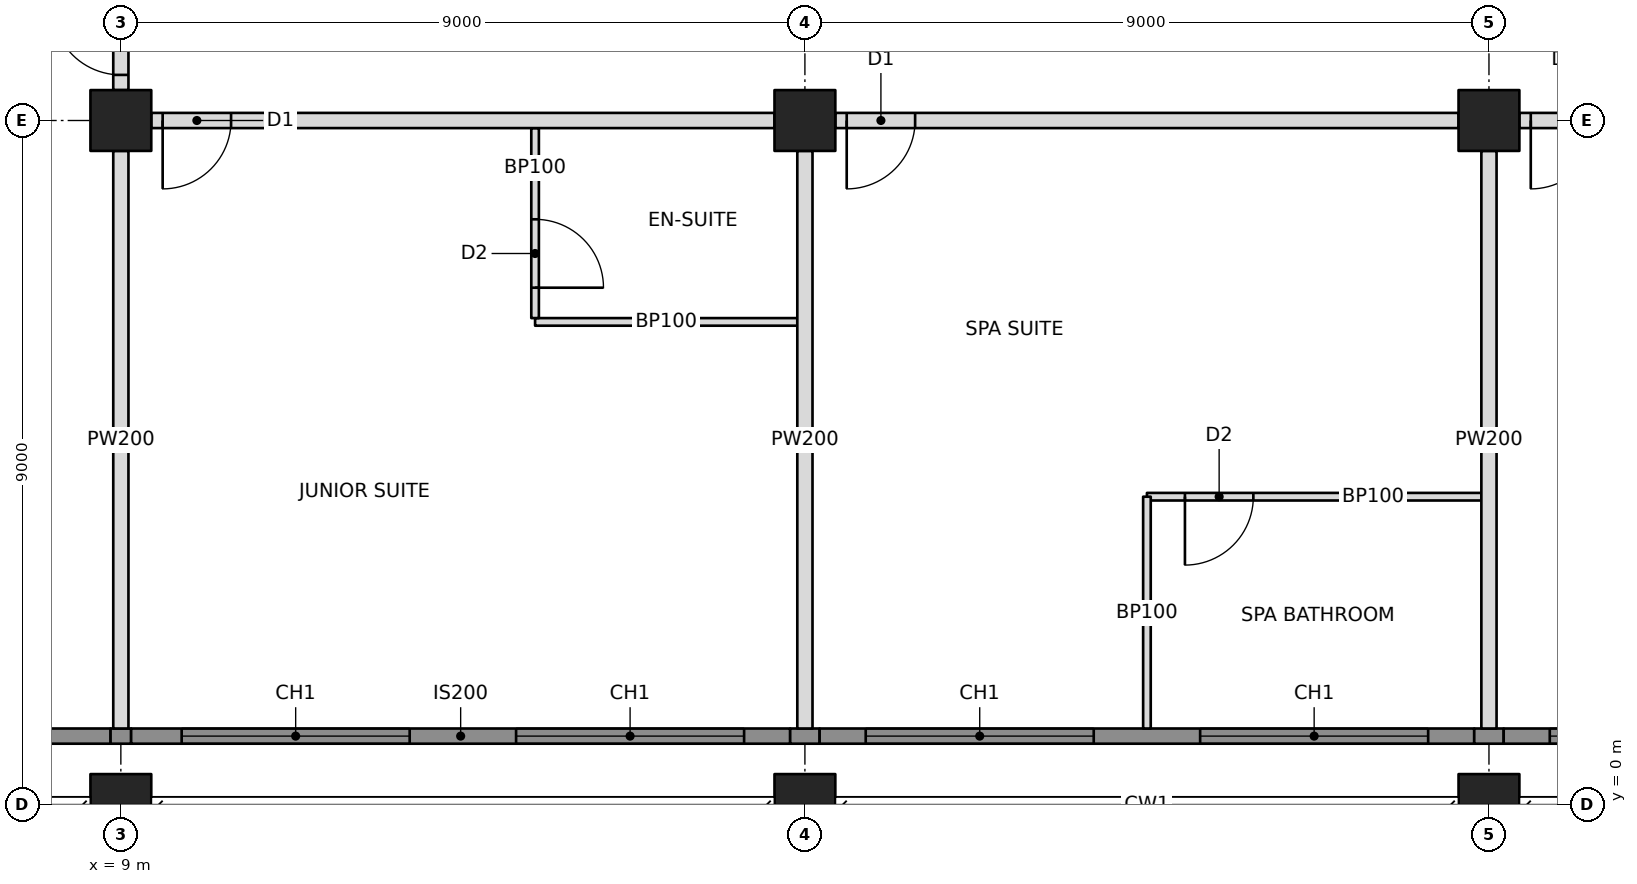
"""IFC4 building model, lengths in metres.
Left out: names, types, materials, properties, quantities, classifications, styles, units other than length and angle.
Written with IfcOpenShell. Run it as: python <this file> out.ifc"""

import sys

from ifc_helpers import new_model, si_unit, direction, frame, frame_2d, origin, origin_2d, place, context, subcontext, project, spatial, rectangle, hollow_rectangle, extrude, element, fill, save


model = new_model("IFC4")
c1 = context("Model", 3, precision=1e-05, world=origin(), true_north=direction((0.0, 1.0)))
c2 = subcontext(c1, "Body", "Model", "MODEL_VIEW")
j1 = project(units=[si_unit("LENGTHUNIT", "METRE"), si_unit("PLANEANGLEUNIT", "RADIAN")], contexts=[c1])
p1 = place(None, origin())
s1 = spatial("IfcSite", under=j1, at=p1, CompositionType="ELEMENT")
p2 = place(p1, origin())
s2 = spatial("IfcBuilding", under=s1, at=p2, CompositionType="ELEMENT")
p3 = place(p2, frame((0.0, 0.0, 177.4)))
s3 = spatial("IfcBuildingStorey", under=s2, at=p3, CompositionType="ELEMENT", Elevation=177.4)
p4 = place(p3, frame((9.0, 0.0, 0.0), z_axis=(0.0, 0.0, 1.0), x_axis=(1.0, 0.0, 0.0)))
e1 = element("IfcColumn", 1, at=p4, inside=s3, PredefinedType="COLUMN", context=c2, shape_type="SweptSolid", body=[
    extrude(hollow_rectangle(XDim=0.8, YDim=0.8, WallThickness=0.07, at=origin_2d()), origin(), (0.0, 0.0, 1.0), 3.4),
])
p5 = place(p3, frame((9.0, 9.0, 0.0), z_axis=(0.0, 0.0, 1.0), x_axis=(1.0, 0.0, 0.0)))
e2 = element("IfcColumn", 2, at=p5, inside=s3, PredefinedType="COLUMN", context=c2, shape_type="SweptSolid", body=[
    extrude(hollow_rectangle(XDim=0.8, YDim=0.8, WallThickness=0.06, at=origin_2d()), origin(), (0.0, 0.0, 1.0), 3.4),
])
p6 = place(p3, frame((18.0, 0.0, 0.0), z_axis=(0.0, 0.0, 1.0), x_axis=(1.0, 0.0, 0.0)))
e3 = element("IfcColumn", 3, at=p6, inside=s3, PredefinedType="COLUMN", context=c2, shape_type="SweptSolid", body=[
    extrude(hollow_rectangle(XDim=0.8, YDim=0.8, WallThickness=0.07, at=origin_2d()), origin(), (0.0, 0.0, 1.0), 3.4),
])
p7 = place(p3, frame((18.0, 9.0, 0.0), z_axis=(0.0, 0.0, 1.0), x_axis=(1.0, 0.0, 0.0)))
e4 = element("IfcColumn", 4, at=p7, inside=s3, PredefinedType="COLUMN", context=c2, shape_type="SweptSolid", body=[
    extrude(hollow_rectangle(XDim=0.8, YDim=0.8, WallThickness=0.06, at=origin_2d()), origin(), (0.0, 0.0, 1.0), 3.4),
])
p8 = place(p3, frame((27.0, 0.0, 0.0), z_axis=(0.0, 0.0, 1.0), x_axis=(1.0, 0.0, 0.0)))
e5 = element("IfcColumn", 5, at=p8, inside=s3, PredefinedType="COLUMN", context=c2, shape_type="SweptSolid", body=[
    extrude(hollow_rectangle(XDim=0.8, YDim=0.8, WallThickness=0.07, at=origin_2d()), origin(), (0.0, 0.0, 1.0), 3.4),
])
p9 = place(p3, frame((27.0, 9.0, 0.0), z_axis=(0.0, 0.0, 1.0), x_axis=(1.0, 0.0, 0.0)))
e6 = element("IfcColumn", 6, at=p9, inside=s3, PredefinedType="COLUMN", context=c2, shape_type="SweptSolid", body=[
    extrude(hollow_rectangle(XDim=0.8, YDim=0.8, WallThickness=0.06, at=origin_2d()), origin(), (0.0, 0.0, 1.0), 3.4),
])
p10 = place(p3, frame((3.0, 0.9, 0.0), z_axis=(0.0, 0.0, 1.0), x_axis=(1.0, 0.0, 0.0)))
e7 = element("IfcWall", 7, at=p10, inside=s3, PredefinedType="SOLIDWALL", context=c2, shape_type="SweptSolid", body=[
    extrude(rectangle(XDim=5.865, YDim=0.2, at=frame_2d((2.932, 0.0))), origin(), (0.0, 0.0, 1.0), 3.2),
])
p11 = place(p10, frame((1.45, 0.0, 0.6)))
e8 = element("IfcOpeningElement", 8, at=p11, cuts=e7, PredefinedType="OPENING", context=c2, shape_type="SweptSolid", body=[
    extrude(rectangle(XDim=3.0, YDim=2.2, at=frame_2d((1.5, 1.1))), frame((0.0, 0.11, 0.0), z_axis=(0.0, -1.0, 0.0), x_axis=(1.0, 0.0, 0.0)), (0.0, 0.0, 1.0), 0.22),
])
p12 = place(p3, frame((9.4, 9.0, 0.0), z_axis=(0.0, 0.0, 1.0), x_axis=(1.0, 0.0, 0.0)))
e9 = element("IfcWall", 9, at=p12, inside=s3, PredefinedType="PARTITIONING", context=c2, shape_type="SweptSolid", body=[
    extrude(rectangle(XDim=8.2, YDim=0.2, at=frame_2d((4.1, 0.0))), origin(), (0.0, 0.0, 1.0), 2.405),
])
p13 = place(p12, frame((0.15, 0.0, 0.0)))
e10 = element("IfcOpeningElement", 10, at=p13, cuts=e9, PredefinedType="OPENING", context=c2, shape_type="SweptSolid", body=[
    extrude(rectangle(XDim=0.9, YDim=2.1, at=frame_2d((0.45, 1.05))), frame((0.0, 0.11, 0.0), z_axis=(0.0, -1.0, 0.0), x_axis=(1.0, 0.0, 0.0)), (0.0, 0.0, 1.0), 0.22),
])
p14 = place(p3, frame((18.4, 9.0, 0.0), z_axis=(0.0, 0.0, 1.0), x_axis=(1.0, 0.0, 0.0)))
e11 = element("IfcWall", 11, at=p14, inside=s3, PredefinedType="PARTITIONING", context=c2, shape_type="SweptSolid", body=[
    extrude(rectangle(XDim=8.2, YDim=0.2, at=frame_2d((4.1, 0.0))), origin(), (0.0, 0.0, 1.0), 2.405),
])
p15 = place(p14, frame((0.15, 0.0, 0.0)))
e12 = element("IfcOpeningElement", 12, at=p15, cuts=e11, PredefinedType="OPENING", context=c2, shape_type="SweptSolid", body=[
    extrude(rectangle(XDim=0.9, YDim=2.1, at=frame_2d((0.45, 1.05))), frame((0.0, 0.11, 0.0), z_axis=(0.0, -1.0, 0.0), x_axis=(1.0, 0.0, 0.0)), (0.0, 0.0, 1.0), 0.22),
])
p16 = place(p3, frame((27.4, 9.0, 0.0), z_axis=(0.0, 0.0, 1.0), x_axis=(1.0, 0.0, 0.0)))
e13 = element("IfcWall", 13, at=p16, inside=s3, PredefinedType="PARTITIONING", context=c2, shape_type="SweptSolid", body=[
    extrude(rectangle(XDim=8.2, YDim=0.2, at=frame_2d((4.1, 0.0))), origin(), (0.0, 0.0, 1.0), 2.405),
])
p17 = place(p16, frame((0.15, 0.0, 0.0)))
e14 = element("IfcOpeningElement", 14, at=p17, cuts=e13, PredefinedType="OPENING", context=c2, shape_type="SweptSolid", body=[
    extrude(rectangle(XDim=0.9, YDim=2.1, at=frame_2d((0.45, 1.05))), frame((0.0, 0.11, 0.0), z_axis=(0.0, -1.0, 0.0), x_axis=(1.0, 0.0, 0.0)), (0.0, 0.0, 1.0), 0.22),
])
p18 = place(p3, frame((9.0, 8.6, 0.0), z_axis=(0.0, 0.0, 1.0), x_axis=(0.0, -1.0, 0.0)))
e15 = element("IfcWall", 15, at=p18, inside=s3, PredefinedType="PARTITIONING", context=c2, shape_type="SweptSolid", body=[
    extrude(rectangle(XDim=7.6, YDim=0.2, at=frame_2d((3.8, 0.0))), origin(), (0.0, 0.0, 1.0), 2.438),
])
for number, where, z_axis, x_axis in (
    (16, (18.0, 8.6, 0.0), (0.0, 0.0, 1.0), (0.0, -1.0, 0.0)),
    (17, (27.0, 8.6, 0.0), (0.0, 0.0, 1.0), (0.0, -1.0, 0.0)),
):
    element("IfcWall", number, at=place(p3, frame(where, z_axis=z_axis, x_axis=x_axis)), inside=s3, PredefinedType="PARTITIONING", context=c2, shape_type="SweptSolid", body=[
        extrude(rectangle(XDim=7.6, YDim=0.2, at=frame_2d((3.8, 0.0))), origin(), (0.0, 0.0, 1.0), 2.405),
    ])
p19 = place(p3, frame((14.45, 6.35, 0.0), z_axis=(0.0, 0.0, 1.0), x_axis=(1.0, 0.0, 0.0)))
e18 = element("IfcWall", 18, at=p19, inside=s3, PredefinedType="PARTITIONING", context=c2, shape_type="SweptSolid", body=[
    extrude(rectangle(XDim=3.45, YDim=0.1, at=frame_2d((1.725, 0.0))), origin(), (0.0, 0.0, 1.0), 2.404),
])
p20 = place(p3, frame((14.45, 8.9, 0.0), z_axis=(0.0, 0.0, 1.0), x_axis=(0.0, -1.0, 0.0)))
e19 = element("IfcWall", 19, at=p20, inside=s3, PredefinedType="PARTITIONING", context=c2, shape_type="SweptSolid", body=[
    extrude(rectangle(XDim=2.5, YDim=0.1, at=frame_2d((1.25, 0.0))), origin(), (0.0, 0.0, 1.0), 2.404),
])
p21 = place(p20, frame((1.2, 0.0, 0.0)))
e20 = element("IfcOpeningElement", 20, at=p21, cuts=e19, PredefinedType="OPENING", context=c2, shape_type="SweptSolid", body=[
    extrude(rectangle(XDim=0.9, YDim=2.1, at=frame_2d((0.45, 1.05))), frame((0.0, 0.06, 0.0), z_axis=(0.0, -1.0, 0.0), x_axis=(1.0, 0.0, 0.0)), (0.0, 0.0, 1.0), 0.12),
])
p22 = place(p3, frame((22.5, 4.05, 0.0), z_axis=(0.0, 0.0, 1.0), x_axis=(1.0, 0.0, 0.0)))
e21 = element("IfcWall", 21, at=p22, inside=s3, PredefinedType="PARTITIONING", context=c2, shape_type="SweptSolid", body=[
    extrude(rectangle(XDim=4.4, YDim=0.1, at=frame_2d((2.2, 0.0))), origin(), (0.0, 0.0, 1.0), 2.404),
])
p23 = place(p22, frame((0.5, 0.0, 0.0)))
e22 = element("IfcOpeningElement", 22, at=p23, cuts=e21, PredefinedType="OPENING", context=c2, shape_type="SweptSolid", body=[
    extrude(rectangle(XDim=0.9, YDim=2.1, at=frame_2d((0.45, 1.05))), frame((0.0, 0.06, 0.0), z_axis=(0.0, -1.0, 0.0), x_axis=(1.0, 0.0, 0.0)), (0.0, 0.0, 1.0), 0.12),
])
p24 = place(p3, frame((22.5, 4.05, 0.0), z_axis=(0.0, 0.0, 1.0), x_axis=(0.0, -1.0, 0.0)))
e23 = element("IfcWall", 23, at=p24, inside=s3, PredefinedType="PARTITIONING", context=c2, shape_type="SweptSolid", body=[
    extrude(rectangle(XDim=3.05, YDim=0.1, at=frame_2d((1.525, 0.0))), origin(), (0.0, 0.0, 1.0), 3.2),
])
p25 = place(p3, frame((9.0, 9.4, 0.0), z_axis=(0.0, 0.0, 1.0), x_axis=(0.0, 1.0, 0.0)))
e24 = element("IfcWall", 24, at=p25, inside=s3, PredefinedType="PARTITIONING", context=c2, shape_type="SweptSolid", body=[
    extrude(rectangle(XDim=1.3, YDim=0.2, at=frame_2d((0.65, 0.0))), origin(), (0.0, 0.0, 1.0), 2.405),
])
p26 = place(p25, frame((0.2, 0.0, 0.0)))
e25 = element("IfcOpeningElement", 25, at=p26, cuts=e24, PredefinedType="OPENING", context=c2, shape_type="SweptSolid", body=[
    extrude(rectangle(XDim=0.9, YDim=2.1, at=frame_2d((0.45, 1.05))), frame((0.0, 0.11, 0.0), z_axis=(0.0, -1.0, 0.0), x_axis=(1.0, 0.0, 0.0)), (0.0, 0.0, 1.0), 0.22),
])
p27 = place(p3, frame((8.865, 0.9, 0.0), z_axis=(0.0, 0.0, 1.0), x_axis=(1.0, 0.0, 0.0)))
e26 = element("IfcWall", 26, at=p27, inside=s3, PredefinedType="SOLIDWALL", context=c2, shape_type="SweptSolid", body=[
    extrude(rectangle(XDim=0.271, YDim=0.2, at=frame_2d((0.135, 0.0))), origin(), (0.0, 0.0, 1.0), 2.438),
])
p28 = place(p3, frame((9.135, 0.9, 0.0), z_axis=(0.0, 0.0, 1.0), x_axis=(1.0, 0.0, 0.0)))
e27 = element("IfcWall", 27, at=p28, inside=s3, PredefinedType="SOLIDWALL", context=c2, shape_type="SweptSolid", body=[
    extrude(rectangle(XDim=8.671, YDim=0.2, at=frame_2d((4.335, 0.0))), origin(), (0.0, 0.0, 1.0), 3.2),
])
p29 = place(p28, frame((0.665, 0.0, 0.6)))
e28 = element("IfcOpeningElement", 28, at=p29, cuts=e27, PredefinedType="OPENING", context=c2, shape_type="SweptSolid", body=[
    extrude(rectangle(XDim=3.0, YDim=2.2, at=frame_2d((1.5, 1.1))), frame((0.0, 0.11, 0.0), z_axis=(0.0, -1.0, 0.0), x_axis=(1.0, 0.0, 0.0)), (0.0, 0.0, 1.0), 0.22),
])
p30 = place(p28, frame((5.065, 0.0, 0.6)))
e29 = element("IfcOpeningElement", 29, at=p30, cuts=e27, PredefinedType="OPENING", context=c2, shape_type="SweptSolid", body=[
    extrude(rectangle(XDim=3.0, YDim=2.2, at=frame_2d((1.5, 1.1))), frame((0.0, 0.11, 0.0), z_axis=(0.0, -1.0, 0.0), x_axis=(1.0, 0.0, 0.0)), (0.0, 0.0, 1.0), 0.22),
])
p31 = place(p3, frame((17.806, 0.9, 0.0), z_axis=(0.0, 0.0, 1.0), x_axis=(1.0, 0.0, 0.0)))
e30 = element("IfcWall", 30, at=p31, inside=s3, PredefinedType="SOLIDWALL", context=c2, shape_type="SweptSolid", body=[
    extrude(rectangle(XDim=0.388, YDim=0.2, at=frame_2d((0.194, 0.0))), origin(), (0.0, 0.0, 1.0), 2.404),
])
p32 = place(p3, frame((18.194, 0.9, 0.0), z_axis=(0.0, 0.0, 1.0), x_axis=(1.0, 0.0, 0.0)))
e31 = element("IfcWall", 31, at=p32, inside=s3, PredefinedType="SOLIDWALL", context=c2, shape_type="SweptSolid", body=[
    extrude(rectangle(XDim=8.612, YDim=0.2, at=frame_2d((4.306, 0.0))), origin(), (0.0, 0.0, 1.0), 3.2),
])
p33 = place(p32, frame((0.606, 0.0, 0.6)))
e32 = element("IfcOpeningElement", 32, at=p33, cuts=e31, PredefinedType="OPENING", context=c2, shape_type="SweptSolid", body=[
    extrude(rectangle(XDim=3.0, YDim=2.2, at=frame_2d((1.5, 1.1))), frame((0.0, 0.11, 0.0), z_axis=(0.0, -1.0, 0.0), x_axis=(1.0, 0.0, 0.0)), (0.0, 0.0, 1.0), 0.22),
])
p34 = place(p32, frame((5.006, 0.0, 0.6)))
e33 = element("IfcOpeningElement", 33, at=p34, cuts=e31, PredefinedType="OPENING", context=c2, shape_type="SweptSolid", body=[
    extrude(rectangle(XDim=3.0, YDim=2.2, at=frame_2d((1.5, 1.1))), frame((0.0, 0.11, 0.0), z_axis=(0.0, -1.0, 0.0), x_axis=(1.0, 0.0, 0.0)), (0.0, 0.0, 1.0), 0.22),
])
p35 = place(p3, frame((26.806, 0.9, 0.0), z_axis=(0.0, 0.0, 1.0), x_axis=(1.0, 0.0, 0.0)))
e34 = element("IfcWall", 34, at=p35, inside=s3, PredefinedType="SOLIDWALL", context=c2, shape_type="SweptSolid", body=[
    extrude(rectangle(XDim=0.388, YDim=0.2, at=frame_2d((0.194, 0.0))), origin(), (0.0, 0.0, 1.0), 2.404),
])
p36 = place(p3, frame((27.194, 0.9, 0.0), z_axis=(0.0, 0.0, 1.0), x_axis=(1.0, 0.0, 0.0)))
e35 = element("IfcWall", 35, at=p36, inside=s3, PredefinedType="SOLIDWALL", context=c2, shape_type="SweptSolid", body=[
    extrude(rectangle(XDim=8.671, YDim=0.2, at=frame_2d((4.335, 0.0))), origin(), (0.0, 0.0, 1.0), 3.2),
])
p37 = place(p36, frame((0.606, 0.0, 0.6)))
e36 = element("IfcOpeningElement", 36, at=p37, cuts=e35, PredefinedType="OPENING", context=c2, shape_type="SweptSolid", body=[
    extrude(rectangle(XDim=3.0, YDim=2.2, at=frame_2d((1.5, 1.1))), frame((0.0, 0.11, 0.0), z_axis=(0.0, -1.0, 0.0), x_axis=(1.0, 0.0, 0.0)), (0.0, 0.0, 1.0), 0.22),
])
p38 = place(p36, frame((5.006, 0.0, 0.6)))
e37 = element("IfcOpeningElement", 37, at=p38, cuts=e35, PredefinedType="OPENING", context=c2, shape_type="SweptSolid", body=[
    extrude(rectangle(XDim=3.0, YDim=2.2, at=frame_2d((1.5, 1.1))), frame((0.0, 0.11, 0.0), z_axis=(0.0, -1.0, 0.0), x_axis=(1.0, 0.0, 0.0)), (0.0, 0.0, 1.0), 0.22),
])
p39 = place(p29, origin())
e38 = element("IfcWindow", 38, at=p39, inside=s3, PartitioningType="TRIPLE_PANEL_VERTICAL", PredefinedType="WINDOW", context=c2, shape_type="SweptSolid", body=[
    extrude(rectangle(XDim=3.0, YDim=2.2, at=frame_2d((1.5, 1.1))), frame((0.0, 0.03, 0.0), z_axis=(0.0, -1.0, 0.0), x_axis=(1.0, 0.0, 0.0)), (0.0, 0.0, 1.0), 0.06),
])
fill(e28, e38)
p40 = place(p30, origin())
e39 = element("IfcWindow", 39, at=p40, inside=s3, PartitioningType="TRIPLE_PANEL_VERTICAL", PredefinedType="WINDOW", context=c2, shape_type="SweptSolid", body=[
    extrude(rectangle(XDim=3.0, YDim=2.2, at=frame_2d((1.5, 1.1))), frame((0.0, 0.03, 0.0), z_axis=(0.0, -1.0, 0.0), x_axis=(1.0, 0.0, 0.0)), (0.0, 0.0, 1.0), 0.06),
])
fill(e29, e39)
p41 = place(p33, origin())
e40 = element("IfcWindow", 40, at=p41, inside=s3, PartitioningType="TRIPLE_PANEL_VERTICAL", PredefinedType="WINDOW", context=c2, shape_type="SweptSolid", body=[
    extrude(rectangle(XDim=3.0, YDim=2.2, at=frame_2d((1.5, 1.1))), frame((0.0, 0.03, 0.0), z_axis=(0.0, -1.0, 0.0), x_axis=(1.0, 0.0, 0.0)), (0.0, 0.0, 1.0), 0.06),
])
fill(e32, e40)
p42 = place(p34, origin())
e41 = element("IfcWindow", 41, at=p42, inside=s3, PartitioningType="TRIPLE_PANEL_VERTICAL", PredefinedType="WINDOW", context=c2, shape_type="SweptSolid", body=[
    extrude(rectangle(XDim=3.0, YDim=2.2, at=frame_2d((1.5, 1.1))), frame((0.0, 0.03, 0.0), z_axis=(0.0, -1.0, 0.0), x_axis=(1.0, 0.0, 0.0)), (0.0, 0.0, 1.0), 0.06),
])
fill(e33, e41)
p43 = place(p37, origin())
e42 = element("IfcWindow", 42, at=p43, inside=s3, PartitioningType="TRIPLE_PANEL_VERTICAL", PredefinedType="WINDOW", context=c2, shape_type="SweptSolid", body=[
    extrude(rectangle(XDim=3.0, YDim=2.2, at=frame_2d((1.5, 1.1))), frame((0.0, 0.03, 0.0), z_axis=(0.0, -1.0, 0.0), x_axis=(1.0, 0.0, 0.0)), (0.0, 0.0, 1.0), 0.06),
])
fill(e36, e42)
p44 = place(p21, origin())
e43 = element("IfcDoor", 43, at=p44, inside=s3, OperationType="SINGLE_SWING_RIGHT", PredefinedType="DOOR", context=c2, shape_type="SweptSolid", body=[
    extrude(rectangle(XDim=0.9, YDim=2.1, at=frame_2d((0.45, 1.05))), frame((0.0, 0.025, 0.0), z_axis=(0.0, -1.0, 0.0), x_axis=(1.0, 0.0, 0.0)), (0.0, 0.0, 1.0), 0.05),
])
fill(e20, e43)
p45 = place(p13, frame((0.9, 0.0, 0.0), z_axis=(0.0, 0.0, 1.0), x_axis=(-1.0, 0.0, 0.0)))
e44 = element("IfcDoor", 44, at=p45, inside=s3, OperationType="SINGLE_SWING_RIGHT", PredefinedType="DOOR", context=c2, shape_type="SweptSolid", body=[
    extrude(rectangle(XDim=0.9, YDim=2.1, at=frame_2d((0.45, 1.05))), frame((0.0, 0.025, 0.0), z_axis=(0.0, -1.0, 0.0), x_axis=(1.0, 0.0, 0.0)), (0.0, 0.0, 1.0), 0.05),
])
fill(e10, e44)
p46 = place(p23, frame((0.9, 0.0, 0.0), z_axis=(0.0, 0.0, 1.0), x_axis=(-1.0, 0.0, 0.0)))
e45 = element("IfcDoor", 45, at=p46, inside=s3, OperationType="SINGLE_SWING_RIGHT", PredefinedType="DOOR", context=c2, shape_type="SweptSolid", body=[
    extrude(rectangle(XDim=0.9, YDim=2.1, at=frame_2d((0.45, 1.05))), frame((0.0, 0.025, 0.0), z_axis=(0.0, -1.0, 0.0), x_axis=(1.0, 0.0, 0.0)), (0.0, 0.0, 1.0), 0.05),
])
fill(e22, e45)
p47 = place(p15, frame((0.9, 0.0, 0.0), z_axis=(0.0, 0.0, 1.0), x_axis=(-1.0, 0.0, 0.0)))
e46 = element("IfcDoor", 46, at=p47, inside=s3, OperationType="SINGLE_SWING_RIGHT", PredefinedType="DOOR", context=c2, shape_type="SweptSolid", body=[
    extrude(rectangle(XDim=0.9, YDim=2.1, at=frame_2d((0.45, 1.05))), frame((0.0, 0.025, 0.0), z_axis=(0.0, -1.0, 0.0), x_axis=(1.0, 0.0, 0.0)), (0.0, 0.0, 1.0), 0.05),
])
fill(e12, e46)
p48 = place(p17, frame((0.9, 0.0, 0.0), z_axis=(0.0, 0.0, 1.0), x_axis=(-1.0, 0.0, 0.0)))
e47 = element("IfcDoor", 47, at=p48, inside=s3, OperationType="SINGLE_SWING_RIGHT", PredefinedType="DOOR", context=c2, shape_type="SweptSolid", body=[
    extrude(rectangle(XDim=0.9, YDim=2.1, at=frame_2d((0.45, 1.05))), frame((0.0, 0.025, 0.0), z_axis=(0.0, -1.0, 0.0), x_axis=(1.0, 0.0, 0.0)), (0.0, 0.0, 1.0), 0.05),
])
fill(e14, e47)
p49 = place(p26, origin())
e48 = element("IfcDoor", 48, at=p49, inside=s3, OperationType="SINGLE_SWING_RIGHT", PredefinedType="DOOR", context=c2, shape_type="SweptSolid", body=[
    extrude(rectangle(XDim=0.9, YDim=2.1, at=frame_2d((0.45, 1.05))), frame((0.0, 0.025, 0.0), z_axis=(0.0, -1.0, 0.0), x_axis=(1.0, 0.0, 0.0)), (0.0, 0.0, 1.0), 0.05),
])
fill(e25, e48)
save(model, sys.argv[1])
